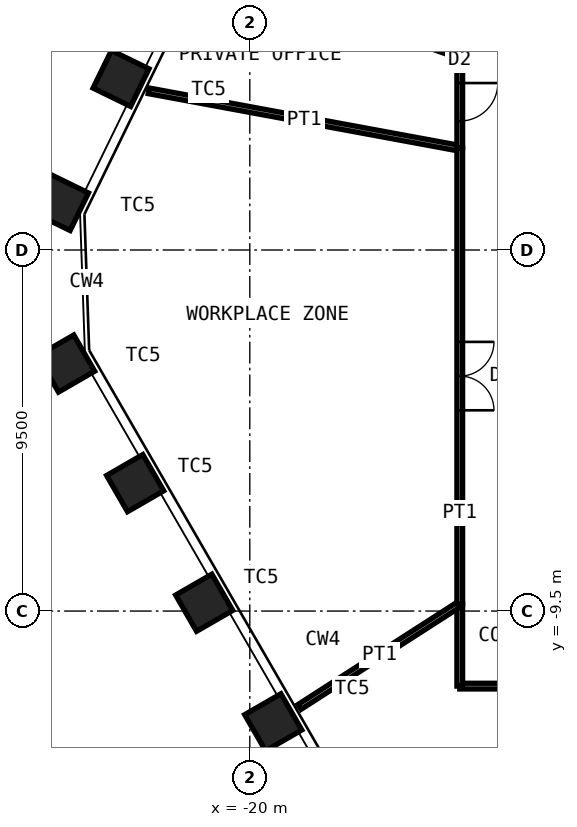
"""IFC4 building model, lengths in metres.
Left out: names, types, materials, properties, quantities, classifications, styles, units other than length and angle.
Written with IfcOpenShell. Run it as: python <this file> out.ifc"""

import sys

from ifc_helpers import new_model, si_unit, direction, frame, frame_2d, origin, origin_2d, place, context, subcontext, project, spatial, rectangle, hollow_rectangle, extrude, element, fill, save


model = new_model("IFC4")
c1 = context("Model", 3, precision=1e-05, world=origin(), true_north=direction((0.0, 1.0)))
c2 = subcontext(c1, "Body", "Model", "MODEL_VIEW")
j1 = project(units=[si_unit("LENGTHUNIT", "METRE"), si_unit("PLANEANGLEUNIT", "RADIAN")], contexts=[c1])
p1 = place(None, origin())
s1 = spatial("IfcSite", under=j1, at=p1, CompositionType="ELEMENT")
p2 = place(p1, origin())
s2 = spatial("IfcBuilding", under=s1, at=p2, CompositionType="ELEMENT")
p3 = place(p2, frame((0.0, 0.0, 184.6)))
s3 = spatial("IfcBuildingStorey", under=s2, at=p3, CompositionType="ELEMENT", Elevation=184.6)
for number, where, z_axis, x_axis in (
    (1, (-19.383, -12.428, 0.0), (0.0, 0.0, 1.0), (0.5, -0.866, 0.0)),
    (2, (-21.2, -9.281, 0.0), (0.0, 0.0, 1.0), (0.5, -0.866, 0.0)),
    (3, (-23.016, -6.134, 0.0), (0.0, 0.0, 1.0), (0.5, -0.866, 0.0)),
    (4, (-24.833, -2.988, 0.0), (0.0, 0.0, 1.0), (0.5, -0.866, 0.0)),
    (5, (-24.981, 1.248, 0.0), (0.0, 0.0, 1.0), (-0.438, -0.899, 0.0)),
    (6, (-23.388, 4.514, 0.0), (0.0, 0.0, 1.0), (-0.438, -0.899, 0.0)),
):
    element("IfcColumn", number, at=place(p3, frame(where, z_axis=z_axis, x_axis=x_axis)), inside=s3, PredefinedType="COLUMN", context=c2, shape_type="SweptSolid", body=[
        extrude(hollow_rectangle(XDim=1.1, YDim=1.1, WallThickness=0.07, at=origin_2d()), origin(), (0.0, 0.0, 1.0), 4.2),
    ])
p4 = place(p3, frame((-22.661, 4.189, 0.0), z_axis=(0.0, 0.0, 1.0), x_axis=(0.983345347199, -0.181746879316, 0.0)))
e7 = element("IfcWall", 7, at=p4, inside=s3, PredefinedType="PARTITIONING", context=c2, shape_type="SweptSolid", body=[
    extrude(rectangle(XDim=8.324, YDim=0.15, at=frame_2d((4.162, 0.0))), origin(), (0.0, 0.0, 1.0), 3.43),
])
p5 = place(p3, frame((-14.475, 2.676, 0.0), z_axis=(0.0, 0.0, 1.0), x_axis=(0.0, 1.0, 0.0)))
e8 = element("IfcWall", 8, at=p5, inside=s3, PredefinedType="PARTITIONING", context=c2, shape_type="SweptSolid", body=[
    extrude(rectangle(XDim=2.435, YDim=0.15, at=frame_2d((1.217, 0.0))), origin(), (0.0, 0.0, 1.0), 4.03),
])
p6 = place(p5, frame((0.717, 0.0, 0.0)))
e9 = element("IfcOpeningElement", 9, at=p6, cuts=e8, PredefinedType="OPENING", context=c2, shape_type="SweptSolid", body=[
    extrude(rectangle(XDim=1.0, YDim=2.4, at=frame_2d((0.5, 1.2))), frame((0.0, 0.085, 0.0), z_axis=(0.0, -1.0, 0.0), x_axis=(1.0, 0.0, 0.0)), (0.0, 0.0, 1.0), 0.17),
])
p7 = place(p3, frame((-21.072, 7.439, 0.0), z_axis=(0.0, 0.0, 1.0), x_axis=(0.94295553867, -0.332918686907, 0.0)))
e10 = element("IfcWall", 10, at=p7, inside=s3, PredefinedType="PARTITIONING", context=c2, shape_type="SweptSolid", body=[
    extrude(rectangle(XDim=6.996, YDim=0.15, at=frame_2d((3.498, 0.0))), origin(), (0.0, 0.0, 1.0), 3.43),
])
p8 = place(p3, frame((-14.475, 5.11, 0.0), z_axis=(0.0, 0.0, 1.0), x_axis=(0.0, 1.0, 0.0)))
e11 = element("IfcWall", 11, at=p8, inside=s3, PredefinedType="PARTITIONING", context=c2, shape_type="SweptSolid", body=[
    extrude(rectangle(XDim=2.831, YDim=0.15, at=frame_2d((1.416, 0.0))), origin(), (0.0, 0.0, 1.0), 4.03),
])
p9 = place(p8, frame((0.916, 0.0, 0.0)))
e12 = element("IfcOpeningElement", 12, at=p9, cuts=e11, PredefinedType="OPENING", context=c2, shape_type="SweptSolid", body=[
    extrude(rectangle(XDim=1.0, YDim=2.4, at=frame_2d((0.5, 1.2))), frame((0.0, 0.085, 0.0), z_axis=(0.0, -1.0, 0.0), x_axis=(1.0, 0.0, 0.0)), (0.0, 0.0, 1.0), 0.17),
])
p10 = place(p3, frame((-15.08, -18.294, 0.0), z_axis=(0.0, 0.0, 1.0), x_axis=(0.636052894953, 0.771645459277, 0.0)))
e13 = element("IfcWall", 13, at=p10, inside=s3, PredefinedType="PARTITIONING", context=c2, shape_type="SweptSolid", body=[
    extrude(rectangle(XDim=8.837, YDim=0.15, at=frame_2d((4.418, 0.0))), origin(), (0.0, 0.0, 1.0), 3.43),
])
p11 = place(p3, frame((-9.459, -11.475, 0.0), z_axis=(0.0, 0.0, 1.0), x_axis=(-1.0, 0.0, 0.0)))
e14 = element("IfcWall", 14, at=p11, inside=s3, PredefinedType="PARTITIONING", context=c2, shape_type="SweptSolid", body=[
    extrude(rectangle(XDim=5.016, YDim=0.15, at=frame_2d((2.508, 0.0))), origin(), (0.0, 0.0, 1.0), 4.03),
])
p12 = place(p11, frame((2.008, 0.0, 0.0)))
e15 = element("IfcOpeningElement", 15, at=p12, cuts=e14, PredefinedType="OPENING", context=c2, shape_type="SweptSolid", body=[
    extrude(rectangle(XDim=1.0, YDim=2.4, at=frame_2d((0.5, 1.2))), frame((0.0, 0.085, 0.0), z_axis=(0.0, -1.0, 0.0), x_axis=(1.0, 0.0, 0.0)), (0.0, 0.0, 1.0), 0.17),
])
p13 = place(p3, frame((-14.475, -11.475, 0.0), z_axis=(0.0, 0.0, 1.0), x_axis=(0.0, 1.0, 0.0)))
e16 = element("IfcWall", 16, at=p13, inside=s3, PredefinedType="PARTITIONING", context=c2, shape_type="SweptSolid", body=[
    extrude(rectangle(XDim=2.164, YDim=0.15, at=frame_2d((1.082, 0.0))), origin(), (0.0, 0.0, 1.0), 4.03),
])
p14 = place(p3, frame((-18.693, -12.024, 0.0), z_axis=(0.0, 0.0, 1.0), x_axis=(0.841031335058, 0.540986407824, 0.0)))
e17 = element("IfcWall", 17, at=p14, inside=s3, PredefinedType="PARTITIONING", context=c2, shape_type="SweptSolid", body=[
    extrude(rectangle(XDim=5.015, YDim=0.15, at=frame_2d((2.507, 0.0))), origin(), (0.0, 0.0, 1.0), 3.43),
])
p15 = place(p3, frame((-14.475, -9.311, 0.0), z_axis=(0.0, 0.0, 1.0), x_axis=(0.0, 1.0, 0.0)))
e18 = element("IfcWall", 18, at=p15, inside=s3, PredefinedType="PARTITIONING", context=c2, shape_type="SweptSolid", body=[
    extrude(rectangle(XDim=11.987, YDim=0.15, at=frame_2d((5.993, 0.0))), origin(), (0.0, 0.0, 1.0), 4.03),
])
p16 = place(p15, frame((5.093, 0.0, 0.0)))
e19 = element("IfcOpeningElement", 19, at=p16, cuts=e18, PredefinedType="OPENING", context=c2, shape_type="SweptSolid", body=[
    extrude(rectangle(XDim=1.8, YDim=2.4, at=frame_2d((0.9, 1.2))), frame((0.0, 0.085, 0.0), z_axis=(0.0, -1.0, 0.0), x_axis=(1.0, 0.0, 0.0)), (0.0, 0.0, 1.0), 0.17),
])
p17 = place(p6, origin())
e20 = element("IfcDoor", 20, at=p17, inside=s3, OperationType="SINGLE_SWING_RIGHT", PredefinedType="DOOR", context=c2, shape_type="SweptSolid", body=[
    extrude(rectangle(XDim=1.0, YDim=2.4, at=frame_2d((0.5, 1.2))), frame((0.0, 0.025, 0.0), z_axis=(0.0, -1.0, 0.0), x_axis=(1.0, 0.0, 0.0)), (0.0, 0.0, 1.0), 0.05),
])
fill(e9, e20)
p18 = place(p16, origin())
e21 = element("IfcDoor", 21, at=p18, inside=s3, OperationType="DOUBLE_DOOR_DOUBLE_SWING", PredefinedType="DOOR", context=c2, shape_type="SweptSolid", body=[
    extrude(rectangle(XDim=1.8, YDim=2.4, at=frame_2d((0.9, 1.2))), frame((0.0, 0.025, 0.0), z_axis=(0.0, -1.0, 0.0), x_axis=(1.0, 0.0, 0.0)), (0.0, 0.0, 1.0), 0.05),
])
fill(e19, e21)
save(model, sys.argv[1])
